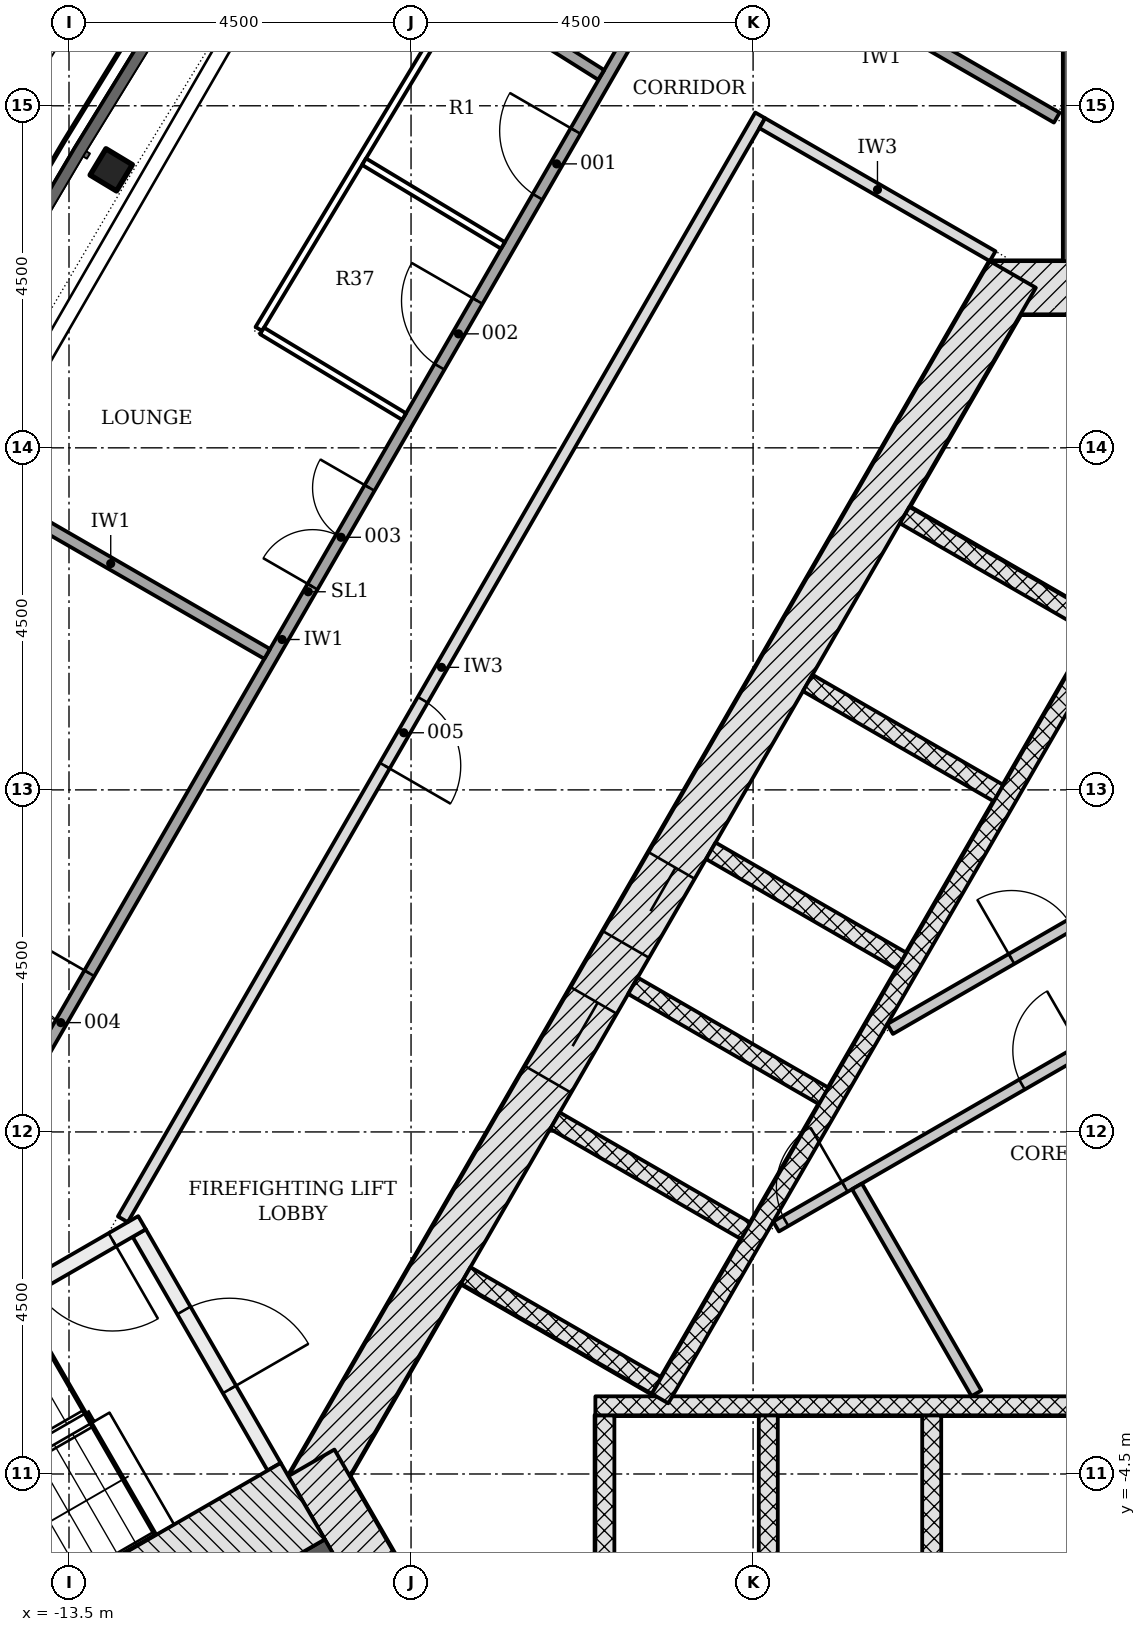
"""IFC4 building model, lengths in metres.
Left out: names, types, materials, properties, quantities, classifications, styles, units other than length and angle.
Written with IfcOpenShell. Run it as: python <this file> out.ifc"""

import sys

from ifc_helpers import new_model, si_unit, direction, frame, frame_2d, origin, origin_2d, place, context, subcontext, project, spatial, rectangle, i_section, extrude, element, fill, save


model = new_model("IFC4")
c1 = context("Model", 3, precision=1e-05, world=origin(), true_north=direction((0.0, 1.0)))
c2 = subcontext(c1, "Body", "Model", "MODEL_VIEW")
j1 = project(units=[si_unit("LENGTHUNIT", "METRE"), si_unit("PLANEANGLEUNIT", "RADIAN")], contexts=[c1])
p1 = place(None, origin())
s1 = spatial("IfcSite", under=j1, at=p1, CompositionType="ELEMENT")
p2 = place(p1, origin())
s2 = spatial("IfcBuilding", under=s1, at=p2, CompositionType="ELEMENT")
p3 = place(p2, frame((0.0, 0.0, 45.6)))
s3 = spatial("IfcBuildingStorey", under=s2, at=p3, CompositionType="ELEMENT", Elevation=45.6)
p4 = place(p3, frame((1.386, 11.106, -0.2), z_axis=(0.0, 0.0, 1.0), x_axis=(-1.0, 0.0, 0.0)))
e1 = element("IfcWall", 1, at=p4, inside=s3, PredefinedType="SHEAR", context=c2, shape_type="SweptSolid", body=[
    extrude(rectangle(XDim=2.771, YDim=0.7, at=frame_2d((1.386, 0.0))), origin(), (0.0, 0.0, 1.0), 3.6),
])
p5 = place(p3, frame((-1.083, 11.281, -0.2), z_axis=(0.0, 0.0, 1.0), x_axis=(-0.500001446645, -0.866024568562, 0.0)))
e2 = element("IfcWall", 2, at=p5, inside=s3, PredefinedType="SHEAR", context=c2, shape_type="SweptSolid", body=[
    extrude(rectangle(XDim=18.458, YDim=0.7, at=frame_2d((9.229, 0.0))), origin(), (0.0, 0.0, 1.0), 3.6),
])
p6 = place(p5, frame((8.979, 0.0, 0.2)))
e3 = element("IfcOpeningElement", 3, at=p6, cuts=e2, PredefinedType="OPENING", context=c2, shape_type="SweptSolid", body=[
    extrude(rectangle(XDim=1.2, YDim=2.1, at=frame_2d((0.6, 1.05))), frame((0.0, 0.36, 0.0), z_axis=(0.0, -1.0, 0.0), x_axis=(1.0, 0.0, 0.0)), (0.0, 0.0, 1.0), 0.72),
])
p7 = place(p5, frame((11.029, 0.0, 0.2)))
e4 = element("IfcOpeningElement", 4, at=p7, cuts=e2, PredefinedType="OPENING", context=c2, shape_type="SweptSolid", body=[
    extrude(rectangle(XDim=1.2, YDim=2.1, at=frame_2d((0.6, 1.05))), frame((0.0, 0.36, 0.0), z_axis=(0.0, -1.0, 0.0), x_axis=(1.0, 0.0, 0.0)), (0.0, 0.0, 1.0), 0.72),
])
p8 = place(p3, frame((-10.311, -4.353, -0.2), z_axis=(0.0, 0.0, 1.0), x_axis=(0.500042739161, -0.866000726912, 0.0)))
e5 = element("IfcWall", 5, at=p8, inside=s3, PredefinedType="SHEAR", context=c2, shape_type="SweptSolid", body=[
    extrude(rectangle(XDim=2.771, YDim=0.7, at=frame_2d((1.386, 0.0))), origin(), (0.0, 0.0, 1.0), 3.6),
])
p9 = place(p3, frame((0.0, 11.456, -0.2), z_axis=(0.0, 0.0, 1.0), x_axis=(0.0, 1.0, 0.0)))
e6 = element("IfcWall", 6, at=p9, inside=s3, PredefinedType="SHEAR", context=c2, shape_type="SweptSolid", body=[
    extrude(rectangle(XDim=14.014, YDim=0.85, at=frame_2d((7.007, 0.0))), origin(), (0.0, 0.0, 1.0), 3.6),
])
p10 = place(p3, frame((-9.922, -5.728, -0.2), z_axis=(0.0, 0.0, 1.0), x_axis=(-0.866021666006, -0.500006473966, 0.0)))
e7 = element("IfcWall", 7, at=p10, inside=s3, PredefinedType="SHEAR", context=c2, shape_type="SweptSolid", body=[
    extrude(rectangle(XDim=14.013, YDim=0.85, at=frame_2d((7.007, 0.0))), origin(), (0.0, 0.0, 1.0), 3.6),
])
p11 = place(p3, frame((-12.944, 12.657, -0.2), z_axis=(0.0, 0.0, 1.0), x_axis=(-0.516291218489, -0.856413088241, 0.0)))
e8 = element("IfcColumn", 8, at=p11, inside=s3, PredefinedType="COLUMN", context=c2, shape_type="SweptSolid", body=[
    extrude(i_section(OverallWidth=0.404, OverallDepth=0.406, WebThickness=0.027, FlangeThickness=0.044, FilletRadius=0.015, at=origin_2d()), origin(), (0.0, 0.0, 1.0), 3.6),
])
for number, where, z_axis, x_axis in (
    (9, (-6.45, -6.228, -0.2), (0.0, 0.0, 1.0), (0.0, 1.0, 0.0)),
    (10, (-4.3, -6.228, -0.2), (0.0, 0.0, 1.0), (0.0, 1.0, 0.0)),
    (11, (-2.15, -6.228, -0.2), (0.0, 0.0, 1.0), (0.0, 1.0, 0.0)),
):
    element("IfcWall", number, at=place(p3, frame(where, z_axis=z_axis, x_axis=x_axis)), inside=s3, PredefinedType="PARTITIONING", context=c2, shape_type="SweptSolid", body=[
        extrude(rectangle(XDim=2.5, YDim=0.25, at=frame_2d((1.25, 0.0))), origin(), (0.0, 0.0, 1.0), 3.6),
    ])
p12 = place(p3, frame((-6.575, -3.603, 0.0), z_axis=(0.0, 0.0, 1.0), x_axis=(1.0, 0.0, 0.0)))
e12 = element("IfcWall", 12, at=p12, inside=s3, PredefinedType="PARTITIONING", context=c2, shape_type="SweptSolid", body=[
    extrude(rectangle(XDim=13.15, YDim=0.25, at=frame_2d((6.575, 0.0))), origin(), (0.0, 0.0, 1.0), 3.4),
])
p13 = place(p3, frame((-2.506, 8.115, -0.2), z_axis=(0.0, 0.0, 1.0), x_axis=(0.865996321171, -0.50005036918, 0.0)))
e13 = element("IfcWall", 13, at=p13, inside=s3, PredefinedType="PARTITIONING", context=c2, shape_type="SweptSolid", body=[
    extrude(rectangle(XDim=2.9, YDim=0.25, at=frame_2d((1.45, 0.0))), origin(), (0.0, 0.0, 1.0), 3.6),
])
for number, where, z_axis, x_axis in (
    (14, (-3.781, 5.907, -0.2), (0.0, 0.0, 1.0), (0.866, -0.5, 0.0)),
    (15, (-5.056, 3.699, -0.2), (0.0, 0.0, 1.0), (0.866, -0.5, 0.0)),
    (16, (-6.081, 1.923, -0.2), (0.0, 0.0, 1.0), (0.866, -0.5, 0.0)),
    (17, (-7.106, 0.148, -0.2), (0.0, 0.0, 1.0), (0.866, -0.5, 0.0)),
    (18, (-8.281, -1.887, -0.2), (0.0, 0.0, 1.0), (0.866, -0.5, 0.0)),
):
    element("IfcWall", number, at=place(p3, frame(where, z_axis=z_axis, x_axis=x_axis)), inside=s3, PredefinedType="PARTITIONING", context=c2, shape_type="SweptSolid", body=[
        extrude(rectangle(XDim=2.9, YDim=0.25, at=frame_2d((1.45, 0.0))), origin(), (0.0, 0.0, 1.0), 3.6),
    ])
p14 = place(p3, frame((0.176, 6.711, 0.0), z_axis=(0.0, 0.0, 1.0), x_axis=(-0.500004227369, -0.866022963098, 0.0)))
e19 = element("IfcWall", 19, at=p14, inside=s3, PredefinedType="PARTITIONING", context=c2, shape_type="SweptSolid", body=[
    extrude(rectangle(XDim=11.8, YDim=0.25, at=frame_2d((5.9, 0.0))), origin(), (0.0, 0.0, 1.0), 3.4),
])
p15 = place(p3, frame((-4.198, -1.244, 0.0), z_axis=(0.0, 0.0, 1.0), x_axis=(0.866020798945, 0.500007975732, 0.0)))
e20 = element("IfcWall", 20, at=p15, inside=s3, PredefinedType="PARTITIONING", context=c2, shape_type="SweptSolid", body=[
    extrude(rectangle(XDim=10.486, YDim=0.15, at=frame_2d((5.243, 0.0))), origin(), (0.0, 0.0, 1.0), 3.4),
])
p16 = place(p15, frame((3.736, 0.0, 0.0)))
e21 = element("IfcOpeningElement", 21, at=p16, cuts=e20, PredefinedType="OPENING", context=c2, shape_type="SweptSolid", body=[
    extrude(rectangle(XDim=0.9, YDim=2.1, at=frame_2d((0.45, 1.05))), frame((0.0, 0.085, 0.0), z_axis=(0.0, -1.0, 0.0), x_axis=(1.0, 0.0, 0.0)), (0.0, 0.0, 1.0), 0.17),
])
p17 = place(p15, frame((0.144, 0.0, 0.0)))
e22 = element("IfcOpeningElement", 22, at=p17, cuts=e20, PredefinedType="OPENING", context=c2, shape_type="SweptSolid", body=[
    extrude(rectangle(XDim=0.9, YDim=2.1, at=frame_2d((0.45, 1.05))), frame((0.0, 0.085, 0.0), z_axis=(0.0, -1.0, 0.0), x_axis=(1.0, 0.0, 0.0)), (0.0, 0.0, 1.0), 0.17),
])
p18 = place(p3, frame((-1.561, -3.439, 0.0), z_axis=(0.0, 0.0, 1.0), x_axis=(-0.499989077369, 0.866031709877, 0.0)))
e23 = element("IfcWall", 23, at=p18, inside=s3, PredefinedType="PARTITIONING", context=c2, shape_type="SweptSolid", body=[
    extrude(rectangle(XDim=3.144, YDim=0.15, at=frame_2d((1.572, 0.0))), origin(), (0.0, 0.0, 1.0), 3.4),
])
p19 = place(p3, frame((-2.698, 1.354, 0.0), z_axis=(0.0, 0.0, 1.0), x_axis=(0.866021157486, 0.500007354732, 0.0)))
e24 = element("IfcWall", 24, at=p19, inside=s3, PredefinedType="PARTITIONING", context=c2, shape_type="SweptSolid", body=[
    extrude(rectangle(XDim=7.888, YDim=0.15, at=frame_2d((3.944, 0.0))), origin(), (0.0, 0.0, 1.0), 3.4),
])
p20 = place(p19, frame((1.845, 0.0, 0.0)))
e25 = element("IfcOpeningElement", 25, at=p20, cuts=e24, PredefinedType="OPENING", context=c2, shape_type="SweptSolid", body=[
    extrude(rectangle(XDim=0.9, YDim=2.1, at=frame_2d((0.45, 1.05))), frame((0.0, 0.085, 0.0), z_axis=(0.0, -1.0, 0.0), x_axis=(1.0, 0.0, 0.0)), (0.0, 0.0, 1.0), 0.17),
])
p21 = place(p3, frame((-12.576, -1.331, -0.2), z_axis=(0.0, 0.0, 1.0), x_axis=(0.499970499736, -0.8660424351, 0.0)))
e26 = element("IfcWall", 26, at=p21, inside=s3, PredefinedType="SHEAR", context=c2, shape_type="SweptSolid", body=[
    extrude(rectangle(XDim=3.55, YDim=0.2, at=frame_2d((1.775, 0.0))), origin(), (0.0, 0.0, 1.0), 3.6),
])
p22 = place(p21, frame((1.175, 0.0, 0.2)))
e27 = element("IfcOpeningElement", 27, at=p22, cuts=e26, PredefinedType="OPENING", context=c2, shape_type="SweptSolid", body=[
    extrude(rectangle(XDim=1.2, YDim=2.1, at=frame_2d((0.6, 1.05))), frame((0.0, 0.11, 0.0), z_axis=(0.0, -1.0, 0.0), x_axis=(1.0, 0.0, 0.0)), (0.0, 0.0, 1.0), 0.22),
])
p23 = place(p3, frame((-12.539, -1.194, -0.2), z_axis=(0.0, 0.0, 1.0), x_axis=(-0.866045472092, -0.499965239061, 0.0)))
e28 = element("IfcWall", 28, at=p23, inside=s3, PredefinedType="SHEAR", context=c2, shape_type="SweptSolid", body=[
    extrude(rectangle(XDim=5.6, YDim=0.2, at=frame_2d((2.8, 0.0))), origin(), (0.0, 0.0, 1.0), 3.6),
])
p24 = place(p23, frame((0.45, 0.0, 0.2)))
e29 = element("IfcOpeningElement", 29, at=p24, cuts=e28, PredefinedType="OPENING", context=c2, shape_type="SweptSolid", body=[
    extrude(rectangle(XDim=1.2, YDim=2.1, at=frame_2d((0.6, 1.05))), frame((0.0, 0.11, 0.0), z_axis=(0.0, -1.0, 0.0), x_axis=(1.0, 0.0, 0.0)), (0.0, 0.0, 1.0), 0.22),
])
p25 = place(p3, frame((-10.424, -4.858, -0.2), z_axis=(0.0, 0.0, 1.0), x_axis=(-0.866033125095, -0.499986626058, 0.0)))
e30 = element("IfcWall", 30, at=p25, inside=s3, PredefinedType="SHEAR", context=c2, shape_type="SweptSolid", body=[
    extrude(rectangle(XDim=7.2, YDim=1.161, at=frame_2d((3.6, 0.0))), origin(), (0.0, 0.0, 1.0), 3.6),
])
p26 = place(p3, frame((-16.256, -3.149, 0.0), z_axis=(0.0, 0.0, 1.0), x_axis=(0.499999683919, 0.866025586274, 0.0)))
e31 = element("IfcWall", 31, at=p26, inside=s3, PredefinedType="PARTITIONING", context=c2, shape_type="SweptSolid", body=[
    extrude(rectangle(XDim=22.234, YDim=0.15, at=frame_2d((11.117, 0.0))), origin(), (0.0, 0.0, 1.0), 2.778),
])
p27 = place(p26, frame((17.842, 0.0, 0.0)))
e32 = element("IfcOpeningElement", 32, at=p27, cuts=e31, PredefinedType="OPENING", context=c2, shape_type="SweptSolid", body=[
    extrude(rectangle(XDim=1.0, YDim=2.1, at=frame_2d((0.5, 1.05))), frame((0.0, 0.085, 0.0), z_axis=(0.0, -1.0, 0.0), x_axis=(1.0, 0.0, 0.0)), (0.0, 0.0, 1.0), 0.17),
])
p28 = place(p26, frame((15.26, 0.0, 0.0)))
e33 = element("IfcOpeningElement", 33, at=p28, cuts=e31, PredefinedType="OPENING", context=c2, shape_type="SweptSolid", body=[
    extrude(rectangle(XDim=1.0, YDim=2.1, at=frame_2d((0.5, 1.05))), frame((0.0, 0.085, 0.0), z_axis=(0.0, -1.0, 0.0), x_axis=(1.0, 0.0, 0.0)), (0.0, 0.0, 1.0), 0.17),
])
p29 = place(p26, frame((11.92, 0.0, 0.0)))
e34 = element("IfcOpeningElement", 34, at=p29, cuts=e31, PredefinedType="OPENING", context=c2, shape_type="SweptSolid", body=[
    extrude(rectangle(XDim=1.5, YDim=2.1, at=frame_2d((0.75, 1.05))), frame((0.0, 0.085, 0.0), z_axis=(0.0, -1.0, 0.0), x_axis=(1.0, 0.0, 0.0)), (0.0, 0.0, 1.0), 0.17),
])
p30 = place(p26, frame((4.547, 0.0, 0.0)))
e35 = element("IfcOpeningElement", 35, at=p30, cuts=e31, PredefinedType="OPENING", context=c2, shape_type="SweptSolid", body=[
    extrude(rectangle(XDim=1.5, YDim=2.1, at=frame_2d((0.75, 1.05))), frame((0.0, 0.085, 0.0), z_axis=(0.0, -1.0, 0.0), x_axis=(1.0, 0.0, 0.0)), (0.0, 0.0, 1.0), 0.17),
])
p31 = place(p3, frame((-4.407, 13.374, 0.0), z_axis=(0.0, 0.0, 1.0), x_axis=(-0.499997181693, -0.866027030928, 0.0)))
e36 = element("IfcWall", 36, at=p31, inside=s3, PredefinedType="PARTITIONING", context=c2, shape_type="SweptSolid", body=[
    extrude(rectangle(XDim=16.77, YDim=0.15, at=frame_2d((8.385, 0.0))), origin(), (0.0, 0.0, 1.0), 2.778),
])
p32 = place(p31, frame((8.879, 0.0, 0.0)))
e37 = element("IfcOpeningElement", 37, at=p32, cuts=e36, PredefinedType="OPENING", context=c2, shape_type="SweptSolid", body=[
    extrude(rectangle(XDim=1.0, YDim=2.1, at=frame_2d((0.5, 1.05))), frame((0.0, 0.085, 0.0), z_axis=(0.0, -1.0, 0.0), x_axis=(1.0, 0.0, 0.0)), (0.0, 0.0, 1.0), 0.17),
])
p33 = place(p3, frame((-5.111, 16.003, 0.0), z_axis=(0.0, 0.0, 1.0), x_axis=(0.866034245675, -0.499984685083, 0.0)))
e38 = element("IfcWall", 38, at=p33, inside=s3, PredefinedType="PARTITIONING", context=c2, shape_type="SweptSolid", body=[
    extrude(rectangle(XDim=5.319, YDim=0.15, at=frame_2d((2.66, 0.0))), origin(), (0.0, 0.0, 1.0), 3.4),
])
p34 = place(p33, frame((1.834, 0.0, 0.0)))
e39 = element("IfcOpeningElement", 39, at=p34, cuts=e38, PredefinedType="OPENING", context=c2, shape_type="SweptSolid", body=[
    extrude(rectangle(XDim=1.5, YDim=2.1, at=frame_2d((0.75, 1.05))), frame((0.0, 0.085, 0.0), z_axis=(0.0, -1.0, 0.0), x_axis=(1.0, 0.0, 0.0)), (0.0, 0.0, 1.0), 0.17),
])
p35 = place(p3, frame((-4.379, 13.271, 0.0), z_axis=(0.0, 0.0, 1.0), x_axis=(0.866019471182, -0.500010275428, 0.0)))
e40 = element("IfcWall", 40, at=p35, inside=s3, PredefinedType="PARTITIONING", context=c2, shape_type="SweptSolid", body=[
    extrude(rectangle(XDim=3.5, YDim=0.15, at=frame_2d((1.75, 0.0))), origin(), (0.0, 0.0, 1.0), 3.4),
])
p36 = place(p3, frame((-15.009, 8.666, 0.0), z_axis=(0.0, 0.0, 1.0), x_axis=(0.866028196007, -0.499995163697, 0.0)))
e41 = element("IfcWall", 41, at=p36, inside=s3, PredefinedType="PARTITIONING", context=c2, shape_type="SweptSolid", body=[
    extrude(rectangle(XDim=4.753, YDim=0.15, at=frame_2d((2.376, 0.0))), origin(), (0.0, 0.0, 1.0), 2.778),
])
p37 = place(p3, frame((-10.378, 16.347, 0.0), z_axis=(0.0, 0.0, 1.0), x_axis=(0.846489789966, -0.532404954414, 0.0)))
e42 = element("IfcWall", 42, at=p37, inside=s3, PredefinedType="PARTITIONING", context=c2, shape_type="SweptSolid", body=[
    extrude(rectangle(XDim=4.584, YDim=0.15, at=frame_2d((2.292, 0.0))), origin(), (0.0, 0.0, 1.0), 2.778),
])
p38 = place(p3, frame((-8.343, 14.977, 0.0), z_axis=(0.0, 0.0, 1.0), x_axis=(-0.516292416674, -0.856412365911, 0.0)))
e43 = element("IfcWall", 43, at=p38, inside=s3, PredefinedType="PARTITIONING", context=c2, shape_type="SweptSolid", body=[
    extrude(rectangle(XDim=5.152, YDim=0.1, at=frame_2d((2.576, 0.0))), origin(), (0.0, 0.0, 1.0), 2.778),
])
p39 = place(p3, frame((-10.96, 10.538, 0.0), z_axis=(0.0, 0.0, 1.0), x_axis=(0.856405167788, -0.516304356544, 0.0)))
e44 = element("IfcWall", 44, at=p39, inside=s3, PredefinedType="PARTITIONING", context=c2, shape_type="SweptSolid", body=[
    extrude(rectangle(XDim=2.182, YDim=0.1, at=frame_2d((1.091, 0.0))), origin(), (0.0, 0.0, 1.0), 3.4),
])
p40 = place(p3, frame((-9.618, 12.765, 0.0), z_axis=(0.0, 0.0, 1.0), x_axis=(0.856420636577, -0.51627869726, 0.0)))
e45 = element("IfcWall", 45, at=p40, inside=s3, PredefinedType="PARTITIONING", context=c2, shape_type="SweptSolid", body=[
    extrude(rectangle(XDim=2.133, YDim=0.1, at=frame_2d((1.067, 0.0))), origin(), (0.0, 0.0, 1.0), 3.4),
])
p41 = place(p6, origin())
e46 = element("IfcDoor", 46, at=p41, inside=s3, OperationType="DOUBLE_DOOR_SLIDING", PredefinedType="DOOR", context=c2, shape_type="SweptSolid", body=[
    extrude(rectangle(XDim=1.2, YDim=2.1, at=frame_2d((0.6, 1.05))), frame((0.0, 0.025, 0.0), z_axis=(0.0, -1.0, 0.0), x_axis=(1.0, 0.0, 0.0)), (0.0, 0.0, 1.0), 0.05),
])
fill(e3, e46)
p42 = place(p7, origin())
e47 = element("IfcDoor", 47, at=p42, inside=s3, OperationType="DOUBLE_DOOR_SLIDING", PredefinedType="DOOR", context=c2, shape_type="SweptSolid", body=[
    extrude(rectangle(XDim=1.2, YDim=2.1, at=frame_2d((0.6, 1.05))), frame((0.0, 0.025, 0.0), z_axis=(0.0, -1.0, 0.0), x_axis=(1.0, 0.0, 0.0)), (0.0, 0.0, 1.0), 0.05),
])
fill(e4, e47)
p43 = place(p16, origin())
e48 = element("IfcDoor", 48, at=p43, inside=s3, OperationType="SINGLE_SWING_RIGHT", PredefinedType="DOOR", context=c2, shape_type="SweptSolid", body=[
    extrude(rectangle(XDim=0.9, YDim=2.1, at=frame_2d((0.45, 1.05))), frame((0.0, 0.025, 0.0), z_axis=(0.0, -1.0, 0.0), x_axis=(1.0, 0.0, 0.0)), (0.0, 0.0, 1.0), 0.05),
])
fill(e21, e48)
p44 = place(p20, origin())
e49 = element("IfcDoor", 49, at=p44, inside=s3, OperationType="SINGLE_SWING_LEFT", PredefinedType="DOOR", context=c2, shape_type="SweptSolid", body=[
    extrude(rectangle(XDim=0.9, YDim=2.1, at=frame_2d((0.45, 1.05))), frame((0.0, 0.025, 0.0), z_axis=(0.0, -1.0, 0.0), x_axis=(1.0, 0.0, 0.0)), (0.0, 0.0, 1.0), 0.05),
])
fill(e25, e49)
p45 = place(p17, origin())
e50 = element("IfcDoor", 50, at=p45, inside=s3, OperationType="SINGLE_SWING_RIGHT", PredefinedType="DOOR", context=c2, shape_type="SweptSolid", body=[
    extrude(rectangle(XDim=0.9, YDim=2.1, at=frame_2d((0.45, 1.05))), frame((0.0, 0.025, 0.0), z_axis=(0.0, -1.0, 0.0), x_axis=(1.0, 0.0, 0.0)), (0.0, 0.0, 1.0), 0.05),
])
fill(e22, e50)
p46 = place(p22, origin())
e51 = element("IfcDoor", 51, at=p46, inside=s3, OperationType="SINGLE_SWING_RIGHT", PredefinedType="DOOR", context=c2, shape_type="SweptSolid", body=[
    extrude(rectangle(XDim=1.2, YDim=2.1, at=frame_2d((0.6, 1.05))), frame((0.0, 0.025, 0.0), z_axis=(0.0, -1.0, 0.0), x_axis=(1.0, 0.0, 0.0)), (0.0, 0.0, 1.0), 0.05),
])
fill(e27, e51)
p47 = place(p24, origin())
e52 = element("IfcDoor", 52, at=p47, inside=s3, OperationType="SINGLE_SWING_LEFT", PredefinedType="DOOR", context=c2, shape_type="SweptSolid", body=[
    extrude(rectangle(XDim=1.2, YDim=2.1, at=frame_2d((0.6, 1.05))), frame((0.0, 0.025, 0.0), z_axis=(0.0, -1.0, 0.0), x_axis=(1.0, 0.0, 0.0)), (0.0, 0.0, 1.0), 0.05),
])
fill(e29, e52)
p48 = place(p27, origin())
e53 = element("IfcDoor", 53, at=p48, inside=s3, OperationType="SINGLE_SWING_RIGHT", PredefinedType="DOOR", context=c2, shape_type="SweptSolid", body=[
    extrude(rectangle(XDim=1.0, YDim=2.1, at=frame_2d((0.5, 1.05))), frame((0.0, 0.025, 0.0), z_axis=(0.0, -1.0, 0.0), x_axis=(1.0, 0.0, 0.0)), (0.0, 0.0, 1.0), 0.05),
])
fill(e32, e53)
p49 = place(p28, origin())
e54 = element("IfcDoor", 54, at=p49, inside=s3, OperationType="SINGLE_SWING_RIGHT", PredefinedType="DOOR", context=c2, shape_type="SweptSolid", body=[
    extrude(rectangle(XDim=1.0, YDim=2.1, at=frame_2d((0.5, 1.05))), frame((0.0, 0.025, 0.0), z_axis=(0.0, -1.0, 0.0), x_axis=(1.0, 0.0, 0.0)), (0.0, 0.0, 1.0), 0.05),
])
fill(e33, e54)
p50 = place(p29, origin())
e55 = element("IfcDoor", 55, at=p50, inside=s3, OperationType="DOUBLE_DOOR_SINGLE_SWING", PredefinedType="DOOR", context=c2, shape_type="SweptSolid", body=[
    extrude(rectangle(XDim=1.5, YDim=2.1, at=frame_2d((0.75, 1.05))), frame((0.0, 0.025, 0.0), z_axis=(0.0, -1.0, 0.0), x_axis=(1.0, 0.0, 0.0)), (0.0, 0.0, 1.0), 0.05),
])
fill(e34, e55)
p51 = place(p30, origin())
e56 = element("IfcDoor", 56, at=p51, inside=s3, OperationType="DOUBLE_DOOR_SINGLE_SWING", PredefinedType="DOOR", context=c2, shape_type="SweptSolid", body=[
    extrude(rectangle(XDim=1.5, YDim=2.1, at=frame_2d((0.75, 1.05))), frame((0.0, 0.025, 0.0), z_axis=(0.0, -1.0, 0.0), x_axis=(1.0, 0.0, 0.0)), (0.0, 0.0, 1.0), 0.05),
])
fill(e35, e56)
p52 = place(p32, origin())
e57 = element("IfcDoor", 57, at=p52, inside=s3, OperationType="SINGLE_SWING_RIGHT", PredefinedType="DOOR", context=c2, shape_type="SweptSolid", body=[
    extrude(rectangle(XDim=1.0, YDim=2.1, at=frame_2d((0.5, 1.05))), frame((0.0, 0.025, 0.0), z_axis=(0.0, -1.0, 0.0), x_axis=(1.0, 0.0, 0.0)), (0.0, 0.0, 1.0), 0.05),
])
fill(e37, e57)
save(model, sys.argv[1])
